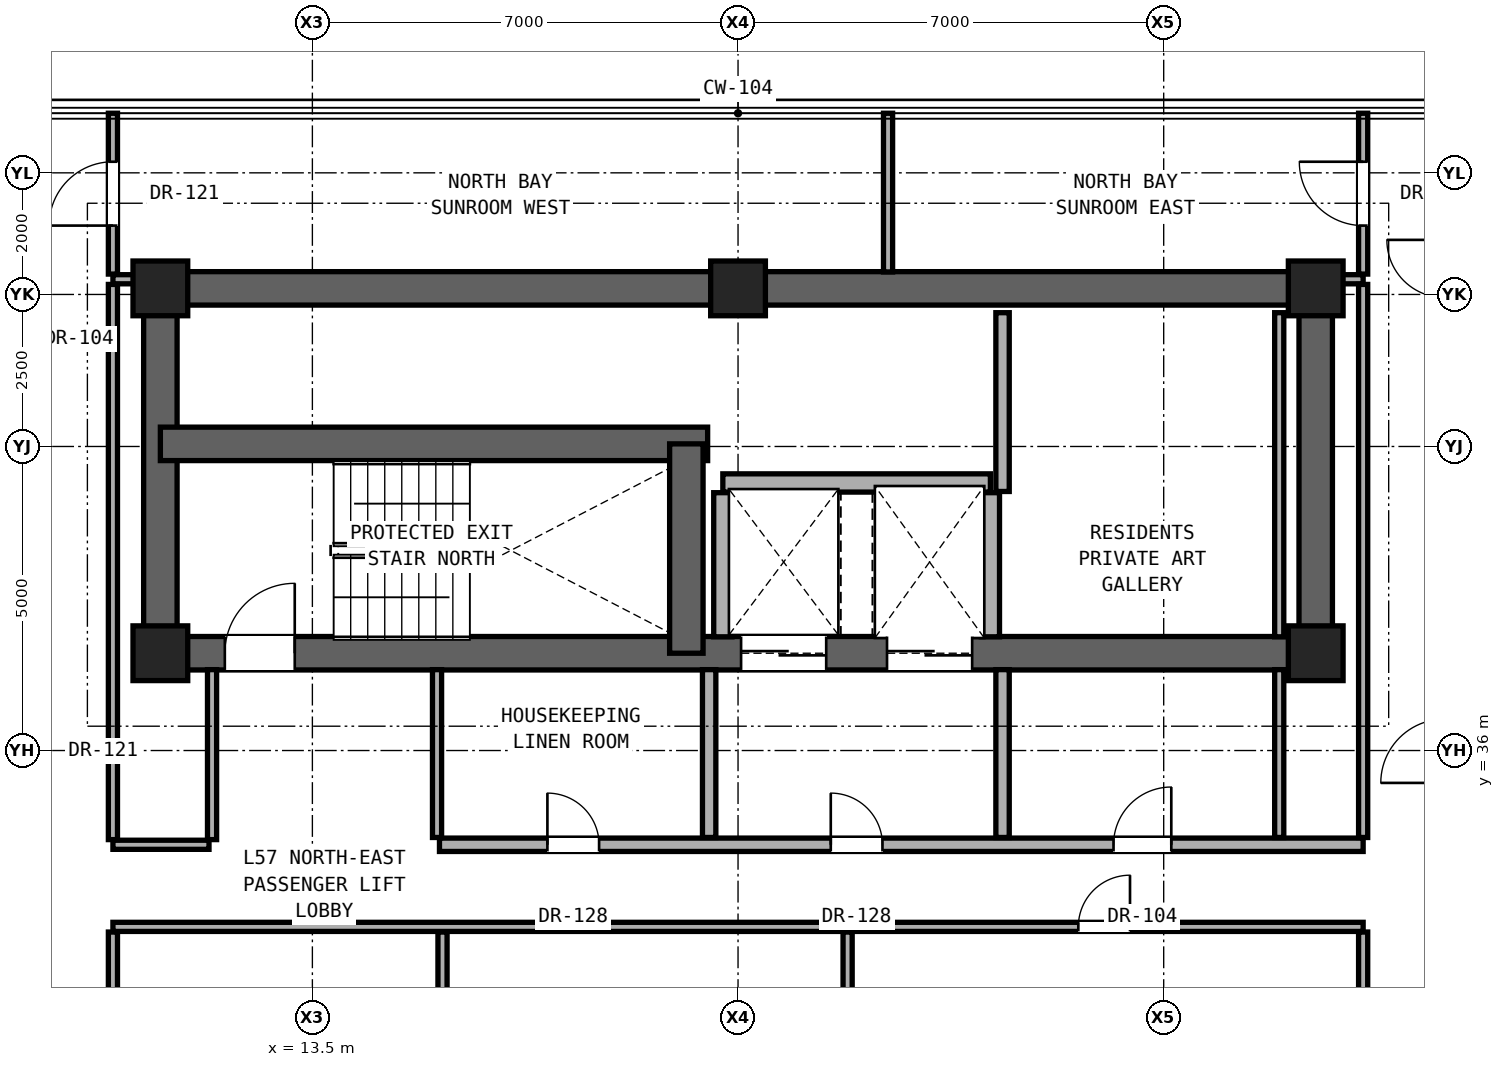
"""IFC4 building model, lengths in metres.
Left out: names, types, materials, properties, quantities, classifications, styles, units other than length and angle.
Written with IfcOpenShell. Run it as: python <this file> out.ifc"""

import sys

from ifc_helpers import new_model, si_unit, direction, frame, frame_2d, origin, origin_2d, place, context, subcontext, project, spatial, rectangle, extrude, element, fill, save


model = new_model("IFC4")
c1 = context("Model", 3, precision=1e-05, world=origin(), true_north=direction((0.0, 1.0)))
c2 = subcontext(c1, "Body", "Model", "MODEL_VIEW")
j1 = project(units=[si_unit("LENGTHUNIT", "METRE"), si_unit("PLANEANGLEUNIT", "RADIAN")], contexts=[c1])
p1 = place(None, origin())
s1 = spatial("IfcSite", under=j1, at=p1, CompositionType="ELEMENT")
p2 = place(p1, origin())
s2 = spatial("IfcBuilding", under=s1, at=p2, CompositionType="ELEMENT")
p3 = place(p2, frame((0.0, 0.0, 199.9)))
s3 = spatial("IfcBuildingStorey", under=s2, at=p3, CompositionType="ELEMENT", Elevation=199.9)
for number, where, z_axis, x_axis in (
    (1, (11.0, 37.6, 0.0), (0.0, 0.0, 1.0), (1.0, 0.0, 0.0)),
    (2, (30.0, 37.6, 0.0), (0.0, 0.0, 1.0), (1.0, 0.0, 0.0)),
    (3, (11.0, 43.6, 0.0), (0.0, 0.0, 1.0), (1.0, 0.0, 0.0)),
    (4, (20.5, 43.6, 0.0), (0.0, 0.0, 1.0), (1.0, 0.0, 0.0)),
    (5, (30.0, 43.6, 0.0), (0.0, 0.0, 1.0), (1.0, 0.0, 0.0)),
):
    element("IfcColumn", number, at=place(p3, frame(where, z_axis=z_axis, x_axis=x_axis)), inside=s3, PredefinedType="COLUMN", context=c2, shape_type="SweptSolid", body=[
        extrude(rectangle(XDim=0.9, YDim=0.9, at=origin_2d()), origin(), (0.0, 0.0, 1.0), 3.25),
    ])
p4 = place(p3, frame((11.0, 43.6, 0.0), z_axis=(0.0, 0.0, 1.0), x_axis=(1.0, 0.0, 0.0)))
e6 = element("IfcWall", 6, at=p4, inside=s3, PredefinedType="SHEAR", context=c2, shape_type="SweptSolid", body=[
    extrude(rectangle(XDim=19.0, YDim=0.55, at=frame_2d((9.5, 0.0))), origin(), (0.0, 0.0, 1.0), 3.05),
])
for number, where, z_axis, x_axis in (
    (7, (11.0, 37.6, 0.0), (0.0, 0.0, 1.0), (0.0, 1.0, 0.0)),
    (8, (30.0, 37.6, 0.0), (0.0, 0.0, 1.0), (0.0, 1.0, 0.0)),
):
    element("IfcWall", number, at=place(p3, frame(where, z_axis=z_axis, x_axis=x_axis)), inside=s3, PredefinedType="SHEAR", context=c2, shape_type="SweptSolid", body=[
        extrude(rectangle(XDim=6.0, YDim=0.55, at=frame_2d((3.0, 0.0))), origin(), (0.0, 0.0, 1.0), 3.05),
    ])
p5 = place(p3, frame((11.0, 37.6, 0.0), z_axis=(0.0, 0.0, 1.0), x_axis=(1.0, 0.0, 0.0)))
e9 = element("IfcWall", 9, at=p5, inside=s3, PredefinedType="SHEAR", context=c2, shape_type="SweptSolid", body=[
    extrude(rectangle(XDim=19.0, YDim=0.55, at=frame_2d((9.5, 0.0))), origin(), (0.0, 0.0, 1.0), 3.05),
])
p6 = place(p5, frame((1.06, 0.0, 0.0)))
e10 = element("IfcOpeningElement", 10, at=p6, cuts=e9, PredefinedType="OPENING", context=c2, shape_type="SweptSolid", body=[
    extrude(rectangle(XDim=1.15, YDim=2.2, at=frame_2d((0.575, 1.1))), frame((0.0, 0.285, 0.0), z_axis=(0.0, -1.0, 0.0), x_axis=(1.0, 0.0, 0.0)), (0.0, 0.0, 1.0), 0.57),
])
p7 = place(p5, frame((9.55, 0.0, 0.0)))
e11 = element("IfcOpeningElement", 11, at=p7, cuts=e9, PredefinedType="OPENING", context=c2, shape_type="SweptSolid", body=[
    extrude(rectangle(XDim=1.4, YDim=2.35, at=frame_2d((0.7, 1.175))), frame((0.0, 0.285, 0.0), z_axis=(0.0, -1.0, 0.0), x_axis=(1.0, 0.0, 0.0)), (0.0, 0.0, 1.0), 0.57),
])
p8 = place(p5, frame((11.95, 0.0, 0.0)))
e12 = element("IfcOpeningElement", 12, at=p8, cuts=e9, PredefinedType="OPENING", context=c2, shape_type="SweptSolid", body=[
    extrude(rectangle(XDim=1.4, YDim=2.35, at=frame_2d((0.7, 1.175))), frame((0.0, 0.285, 0.0), z_axis=(0.0, -1.0, 0.0), x_axis=(1.0, 0.0, 0.0)), (0.0, 0.0, 1.0), 0.57),
])
p9 = place(p3, frame((11.0, 41.043, 0.0), z_axis=(0.0, 0.0, 1.0), x_axis=(1.0, 0.0, 0.0)))
e13 = element("IfcWall", 13, at=p9, inside=s3, PredefinedType="SHEAR", context=c2, shape_type="SweptSolid", body=[
    extrude(rectangle(XDim=9.0, YDim=0.55, at=frame_2d((4.5, 0.0))), origin(), (0.0, 0.0, 1.0), 3.05),
])
p10 = place(p3, frame((19.65, 37.6, 0.0), z_axis=(0.0, 0.0, 1.0), x_axis=(0.0, 1.0, 0.0)))
e14 = element("IfcWall", 14, at=p10, inside=s3, PredefinedType="SHEAR", context=c2, shape_type="SweptSolid", body=[
    extrude(rectangle(XDim=3.443, YDim=0.55, at=frame_2d((1.721, 0.0))), origin(), (0.0, 0.0, 1.0), 3.05),
])
p11 = place(p3, frame((10.22, 33.1, 0.0), z_axis=(0.0, 0.0, 1.0), x_axis=(1.0, 0.0, 0.0)))
e15 = element("IfcWall", 15, at=p11, inside=s3, PredefinedType="PARTITIONING", context=c2, shape_type="SweptSolid", body=[
    extrude(rectangle(XDim=20.56, YDim=0.15, at=frame_2d((10.28, 0.0))), origin(), (0.0, 0.0, 1.0), 2.186),
])
p12 = place(p11, frame((15.876, 0.0, 0.0)))
e16 = element("IfcOpeningElement", 16, at=p12, cuts=e15, PredefinedType="OPENING", context=c2, shape_type="SweptSolid", body=[
    extrude(rectangle(XDim=0.85, YDim=2.01, at=frame_2d((0.425, 1.005))), frame((0.0, 0.085, 0.0), z_axis=(0.0, -1.0, 0.0), x_axis=(1.0, 0.0, 0.0)), (0.0, 0.0, 1.0), 0.17),
])
p13 = place(p3, frame((10.22, 34.45, 0.0), z_axis=(0.0, 0.0, 1.0), x_axis=(1.0, 0.0, 0.0)))
e17 = element("IfcWall", 17, at=p13, inside=s3, PredefinedType="PARTITIONING", context=c2, shape_type="SweptSolid", body=[
    extrude(rectangle(XDim=1.58, YDim=0.15, at=frame_2d((0.79, 0.0))), origin(), (0.0, 0.0, 1.0), 2.186),
])
p14 = place(p3, frame((15.59, 34.45, 0.0), z_axis=(0.0, 0.0, 1.0), x_axis=(1.0, 0.0, 0.0)))
e18 = element("IfcWall", 18, at=p14, inside=s3, PredefinedType="SOLIDWALL", context=c2, shape_type="SweptSolid", body=[
    extrude(rectangle(XDim=15.19, YDim=0.22, at=frame_2d((7.595, 0.0))), origin(), (0.0, 0.0, 1.0), 2.186),
])
p15 = place(p14, frame((6.435, 0.0, 0.0)))
e19 = element("IfcOpeningElement", 19, at=p15, cuts=e18, PredefinedType="OPENING", context=c2, shape_type="SweptSolid", body=[
    extrude(rectangle(XDim=0.85, YDim=2.01, at=frame_2d((0.425, 1.005))), frame((0.0, 0.12, 0.0), z_axis=(0.0, -1.0, 0.0), x_axis=(1.0, 0.0, 0.0)), (0.0, 0.0, 1.0), 0.24),
])
p16 = place(p14, frame((11.085, 0.0, 0.0)))
e20 = element("IfcOpeningElement", 20, at=p16, cuts=e18, PredefinedType="OPENING", context=c2, shape_type="SweptSolid", body=[
    extrude(rectangle(XDim=0.95, YDim=2.15, at=frame_2d((0.475, 1.075))), frame((0.0, 0.12, 0.0), z_axis=(0.0, -1.0, 0.0), x_axis=(1.0, 0.0, 0.0)), (0.0, 0.0, 1.0), 0.24),
])
p17 = place(p14, frame((1.775, 0.0, 0.0)))
e21 = element("IfcOpeningElement", 21, at=p17, cuts=e18, PredefinedType="OPENING", context=c2, shape_type="SweptSolid", body=[
    extrude(rectangle(XDim=0.85, YDim=2.01, at=frame_2d((0.425, 1.005))), frame((0.0, 0.12, 0.0), z_axis=(0.0, -1.0, 0.0), x_axis=(1.0, 0.0, 0.0)), (0.0, 0.0, 1.0), 0.24),
])
p18 = place(p3, frame((20.25, 40.4, 0.0), z_axis=(0.0, 0.0, 1.0), x_axis=(1.0, 0.0, 0.0)))
e22 = element("IfcWall", 22, at=p18, inside=s3, PredefinedType="SOLIDWALL", context=c2, shape_type="SweptSolid", body=[
    extrude(rectangle(XDim=4.4, YDim=0.3, at=frame_2d((2.2, 0.0))), origin(), (0.0, 0.0, 1.0), 3.05),
])
for number, where, z_axis, x_axis in (
    (23, (10.22, 43.75, 0.0), (0.0, 0.0, 1.0), (1.0, 0.0, 0.0)),
    (24, (30.27, 43.75, 0.0), (0.0, 0.0, 1.0), (1.0, 0.0, 0.0)),
):
    element("IfcWall", number, at=place(p3, frame(where, z_axis=z_axis, x_axis=x_axis)), inside=s3, PredefinedType="PARTITIONING", context=c2, shape_type="SweptSolid", body=[
        extrude(rectangle(XDim=0.51, YDim=0.15, at=frame_2d((0.255, 0.0))), origin(), (0.0, 0.0, 1.0), 3.05),
    ])
p19 = place(p3, frame((10.22, 22.935, 0.0), z_axis=(0.0, 0.0, 1.0), x_axis=(0.0, 1.0, 0.0)))
e25 = element("IfcWall", 25, at=p19, inside=s3, PredefinedType="PARTITIONING", context=c2, shape_type="SweptSolid", body=[
    extrude(rectangle(XDim=10.08, YDim=0.15, at=frame_2d((5.04, 0.0))), origin(), (0.0, 0.0, 1.0), 2.346),
])
p20 = place(p19, frame((4.565, 0.0, 0.0)))
e26 = element("IfcOpeningElement", 26, at=p20, cuts=e25, PredefinedType="OPENING", context=c2, shape_type="SweptSolid", body=[
    extrude(rectangle(XDim=0.95, YDim=2.15, at=frame_2d((0.475, 1.075))), frame((0.0, 0.085, 0.0), z_axis=(0.0, -1.0, 0.0), x_axis=(1.0, 0.0, 0.0)), (0.0, 0.0, 1.0), 0.17),
])
p21 = place(p3, frame((10.22, 34.535, 0.0), z_axis=(0.0, 0.0, 1.0), x_axis=(0.0, 1.0, 0.0)))
e27 = element("IfcWall", 27, at=p21, inside=s3, PredefinedType="PARTITIONING", context=c2, shape_type="SweptSolid", body=[
    extrude(rectangle(XDim=9.13, YDim=0.15, at=frame_2d((4.565, 0.0))), origin(), (0.0, 0.0, 1.0), 2.442),
])
p22 = place(p3, frame((10.22, 43.835, 0.0), z_axis=(0.0, 0.0, 1.0), x_axis=(0.0, 1.0, 0.0)))
e28 = element("IfcWall", 28, at=p22, inside=s3, PredefinedType="PARTITIONING", context=c2, shape_type="SweptSolid", body=[
    extrude(rectangle(XDim=2.645, YDim=0.15, at=frame_2d((1.323, 0.0))), origin(), (0.0, 0.0, 1.0), 3.05),
])
p23 = place(p22, frame((0.798, 0.0, 0.0)))
e29 = element("IfcOpeningElement", 29, at=p23, cuts=e28, PredefinedType="OPENING", context=c2, shape_type="SweptSolid", body=[
    extrude(rectangle(XDim=1.05, YDim=2.2, at=frame_2d((0.525, 1.1))), frame((0.0, 0.085, 0.0), z_axis=(0.0, -1.0, 0.0), x_axis=(1.0, 0.0, 0.0)), (0.0, 0.0, 1.0), 0.17),
])
p24 = place(p3, frame((11.85, 34.535, 0.0), z_axis=(0.0, 0.0, 1.0), x_axis=(0.0, 1.0, 0.0)))
e30 = element("IfcWall", 30, at=p24, inside=s3, PredefinedType="PARTITIONING", context=c2, shape_type="SweptSolid", body=[
    extrude(rectangle(XDim=2.795, YDim=0.15, at=frame_2d((1.397, 0.0))), origin(), (0.0, 0.0, 1.0), 3.05),
])
p25 = place(p3, frame((15.64, 22.935, 0.0), z_axis=(0.0, 0.0, 1.0), x_axis=(0.0, 1.0, 0.0)))
e31 = element("IfcWall", 31, at=p25, inside=s3, PredefinedType="PARTITIONING", context=c2, shape_type="SweptSolid", body=[
    extrude(rectangle(XDim=10.08, YDim=0.15, at=frame_2d((5.04, 0.0))), origin(), (0.0, 0.0, 1.0), 2.186),
])
p26 = place(p3, frame((15.55, 34.57, 0.0), z_axis=(0.0, 0.0, 1.0), x_axis=(0.0, 1.0, 0.0)))
e32 = element("IfcWall", 32, at=p26, inside=s3, PredefinedType="PARTITIONING", context=c2, shape_type="SweptSolid", body=[
    extrude(rectangle(XDim=2.76, YDim=0.15, at=frame_2d((1.38, 0.0))), origin(), (0.0, 0.0, 1.0), 3.05),
])
p27 = place(p3, frame((20.025, 34.57, 0.0), z_axis=(0.0, 0.0, 1.0), x_axis=(0.0, 1.0, 0.0)))
e33 = element("IfcWall", 33, at=p27, inside=s3, PredefinedType="SOLIDWALL", context=c2, shape_type="SweptSolid", body=[
    extrude(rectangle(XDim=2.76, YDim=0.22, at=frame_2d((1.38, 0.0))), origin(), (0.0, 0.0, 1.0), 3.05),
])
p28 = place(p3, frame((20.25, 37.87, 0.0), z_axis=(0.0, 0.0, 1.0), x_axis=(0.0, 1.0, 0.0)))
e34 = element("IfcWall", 34, at=p28, inside=s3, PredefinedType="SOLIDWALL", context=c2, shape_type="SweptSolid", body=[
    extrude(rectangle(XDim=2.37, YDim=0.3, at=frame_2d((1.185, 0.0))), origin(), (0.0, 0.0, 1.0), 3.05),
])
p29 = place(p3, frame((22.302, 19.985, 0.0), z_axis=(0.0, 0.0, 1.0), x_axis=(0.0, 1.0, 0.0)))
e35 = element("IfcWall", 35, at=p29, inside=s3, PredefinedType="PARTITIONING", context=c2, shape_type="SweptSolid", body=[
    extrude(rectangle(XDim=13.03, YDim=0.15, at=frame_2d((6.515, 0.0))), origin(), (0.0, 0.0, 1.0), 2.186),
])
p30 = place(p3, frame((22.967, 43.87, 0.0), z_axis=(0.0, 0.0, 1.0), x_axis=(0.0, 1.0, 0.0)))
e36 = element("IfcWall", 36, at=p30, inside=s3, PredefinedType="PARTITIONING", context=c2, shape_type="SweptSolid", body=[
    extrude(rectangle(XDim=2.61, YDim=0.15, at=frame_2d((1.305, 0.0))), origin(), (0.0, 0.0, 1.0), 3.05),
])
p31 = place(p3, frame((24.65, 37.87, 0.0), z_axis=(0.0, 0.0, 1.0), x_axis=(0.0, 1.0, 0.0)))
e37 = element("IfcWall", 37, at=p31, inside=s3, PredefinedType="SOLIDWALL", context=c2, shape_type="SweptSolid", body=[
    extrude(rectangle(XDim=2.37, YDim=0.3, at=frame_2d((1.185, 0.0))), origin(), (0.0, 0.0, 1.0), 3.05),
])
p32 = place(p3, frame((24.85, 34.57, 0.0), z_axis=(0.0, 0.0, 1.0), x_axis=(0.0, 1.0, 0.0)))
e38 = element("IfcWall", 38, at=p32, inside=s3, PredefinedType="SOLIDWALL", context=c2, shape_type="SweptSolid", body=[
    extrude(rectangle(XDim=2.76, YDim=0.22, at=frame_2d((1.38, 0.0))), origin(), (0.0, 0.0, 1.0), 3.05),
])
p33 = place(p3, frame((24.85, 40.26, 0.0), z_axis=(0.0, 0.0, 1.0), x_axis=(0.0, 1.0, 0.0)))
e39 = element("IfcWall", 39, at=p33, inside=s3, PredefinedType="SOLIDWALL", context=c2, shape_type="SweptSolid", body=[
    extrude(rectangle(XDim=2.94, YDim=0.22, at=frame_2d((1.47, 0.0))), origin(), (0.0, 0.0, 1.0), 3.05),
])
p34 = place(p3, frame((29.4, 34.57, 0.0), z_axis=(0.0, 0.0, 1.0), x_axis=(0.0, 1.0, 0.0)))
e40 = element("IfcWall", 40, at=p34, inside=s3, PredefinedType="PARTITIONING", context=c2, shape_type="SweptSolid", body=[
    extrude(rectangle(XDim=2.76, YDim=0.15, at=frame_2d((1.38, 0.0))), origin(), (0.0, 0.0, 1.0), 3.05),
])
p35 = place(p3, frame((29.4, 37.87, 0.0), z_axis=(0.0, 0.0, 1.0), x_axis=(0.0, 1.0, 0.0)))
e41 = element("IfcWall", 41, at=p35, inside=s3, PredefinedType="PARTITIONING", context=c2, shape_type="SweptSolid", body=[
    extrude(rectangle(XDim=5.33, YDim=0.15, at=frame_2d((2.665, 0.0))), origin(), (0.0, 0.0, 1.0), 3.05),
])
p36 = place(p3, frame((30.78, 19.985, 0.0), z_axis=(0.0, 0.0, 1.0), x_axis=(0.0, 1.0, 0.0)))
e42 = element("IfcWall", 42, at=p36, inside=s3, PredefinedType="PARTITIONING", context=c2, shape_type="SweptSolid", body=[
    extrude(rectangle(XDim=13.03, YDim=0.15, at=frame_2d((6.515, 0.0))), origin(), (0.0, 0.0, 1.0), 2.346),
])
p37 = place(p3, frame((30.78, 34.57, 0.0), z_axis=(0.0, 0.0, 1.0), x_axis=(0.0, 1.0, 0.0)))
e43 = element("IfcWall", 43, at=p37, inside=s3, PredefinedType="PARTITIONING", context=c2, shape_type="SweptSolid", body=[
    extrude(rectangle(XDim=9.095, YDim=0.15, at=frame_2d((4.547, 0.0))), origin(), (0.0, 0.0, 1.0), 2.442),
])
p38 = place(p3, frame((30.78, 43.835, 0.0), z_axis=(0.0, 0.0, 1.0), x_axis=(0.0, 1.0, 0.0)))
e44 = element("IfcWall", 44, at=p38, inside=s3, PredefinedType="PARTITIONING", context=c2, shape_type="SweptSolid", body=[
    extrude(rectangle(XDim=2.645, YDim=0.15, at=frame_2d((1.323, 0.0))), origin(), (0.0, 0.0, 1.0), 3.05),
])
p39 = place(p38, frame((0.798, 0.0, 0.0)))
e45 = element("IfcOpeningElement", 45, at=p39, cuts=e44, PredefinedType="OPENING", context=c2, shape_type="SweptSolid", body=[
    extrude(rectangle(XDim=1.05, YDim=2.2, at=frame_2d((0.525, 1.1))), frame((0.0, 0.085, 0.0), z_axis=(0.0, -1.0, 0.0), x_axis=(1.0, 0.0, 0.0)), (0.0, 0.0, 1.0), 0.17),
])
p40 = place(p6, origin())
e46 = element("IfcDoor", 46, at=p40, inside=s3, OperationType="SINGLE_SWING_RIGHT", PredefinedType="DOOR", context=c2, shape_type="SweptSolid", body=[
    extrude(rectangle(XDim=1.15, YDim=2.2, at=frame_2d((0.575, 1.1))), frame((0.0, 0.025, 0.0), z_axis=(0.0, -1.0, 0.0), x_axis=(1.0, 0.0, 0.0)), (0.0, 0.0, 1.0), 0.05),
])
fill(e10, e46)
p41 = place(p15, origin())
e47 = element("IfcDoor", 47, at=p41, inside=s3, OperationType="SINGLE_SWING_LEFT", PredefinedType="DOOR", context=c2, shape_type="SweptSolid", body=[
    extrude(rectangle(XDim=0.85, YDim=2.01, at=frame_2d((0.425, 1.005))), frame((0.0, 0.025, 0.0), z_axis=(0.0, -1.0, 0.0), x_axis=(1.0, 0.0, 0.0)), (0.0, 0.0, 1.0), 0.05),
])
fill(e19, e47)
p42 = place(p16, origin())
e48 = element("IfcDoor", 48, at=p42, inside=s3, OperationType="SINGLE_SWING_RIGHT", PredefinedType="DOOR", context=c2, shape_type="SweptSolid", body=[
    extrude(rectangle(XDim=0.95, YDim=2.15, at=frame_2d((0.475, 1.075))), frame((0.0, 0.025, 0.0), z_axis=(0.0, -1.0, 0.0), x_axis=(1.0, 0.0, 0.0)), (0.0, 0.0, 1.0), 0.05),
])
fill(e20, e48)
p43 = place(p17, origin())
e49 = element("IfcDoor", 49, at=p43, inside=s3, OperationType="SINGLE_SWING_LEFT", PredefinedType="DOOR", context=c2, shape_type="SweptSolid", body=[
    extrude(rectangle(XDim=0.85, YDim=2.01, at=frame_2d((0.425, 1.005))), frame((0.0, 0.025, 0.0), z_axis=(0.0, -1.0, 0.0), x_axis=(1.0, 0.0, 0.0)), (0.0, 0.0, 1.0), 0.05),
])
fill(e21, e49)
p44 = place(p12, origin())
e50 = element("IfcDoor", 50, at=p44, inside=s3, OperationType="SINGLE_SWING_RIGHT", PredefinedType="DOOR", context=c2, shape_type="SweptSolid", body=[
    extrude(rectangle(XDim=0.85, YDim=2.01, at=frame_2d((0.425, 1.005))), frame((0.0, 0.025, 0.0), z_axis=(0.0, -1.0, 0.0), x_axis=(1.0, 0.0, 0.0)), (0.0, 0.0, 1.0), 0.05),
])
fill(e16, e50)
p45 = place(p23, origin())
e51 = element("IfcDoor", 51, at=p45, inside=s3, OperationType="SINGLE_SWING_LEFT", PredefinedType="DOOR", context=c2, shape_type="SweptSolid", body=[
    extrude(rectangle(XDim=1.05, YDim=2.2, at=frame_2d((0.525, 1.1))), frame((0.0, 0.025, 0.0), z_axis=(0.0, -1.0, 0.0), x_axis=(1.0, 0.0, 0.0)), (0.0, 0.0, 1.0), 0.05),
])
fill(e29, e51)
p46 = place(p39, origin())
e52 = element("IfcDoor", 52, at=p46, inside=s3, OperationType="SINGLE_SWING_RIGHT", PredefinedType="DOOR", context=c2, shape_type="SweptSolid", body=[
    extrude(rectangle(XDim=1.05, YDim=2.2, at=frame_2d((0.525, 1.1))), frame((0.0, 0.025, 0.0), z_axis=(0.0, -1.0, 0.0), x_axis=(1.0, 0.0, 0.0)), (0.0, 0.0, 1.0), 0.05),
])
fill(e45, e52)
p47 = place(p7, origin())
e53 = element("IfcDoor", 53, at=p47, inside=s3, OperationType="DOUBLE_DOOR_SLIDING", PredefinedType="DOOR", context=c2, shape_type="SweptSolid", body=[
    extrude(rectangle(XDim=1.4, YDim=2.35, at=frame_2d((0.7, 1.175))), frame((0.0, 0.025, 0.0), z_axis=(0.0, -1.0, 0.0), x_axis=(1.0, 0.0, 0.0)), (0.0, 0.0, 1.0), 0.05),
])
fill(e11, e53)
p48 = place(p8, origin())
e54 = element("IfcDoor", 54, at=p48, inside=s3, OperationType="DOUBLE_DOOR_SLIDING", PredefinedType="DOOR", context=c2, shape_type="SweptSolid", body=[
    extrude(rectangle(XDim=1.4, YDim=2.35, at=frame_2d((0.7, 1.175))), frame((0.0, 0.025, 0.0), z_axis=(0.0, -1.0, 0.0), x_axis=(1.0, 0.0, 0.0)), (0.0, 0.0, 1.0), 0.05),
])
fill(e12, e54)
save(model, sys.argv[1])
